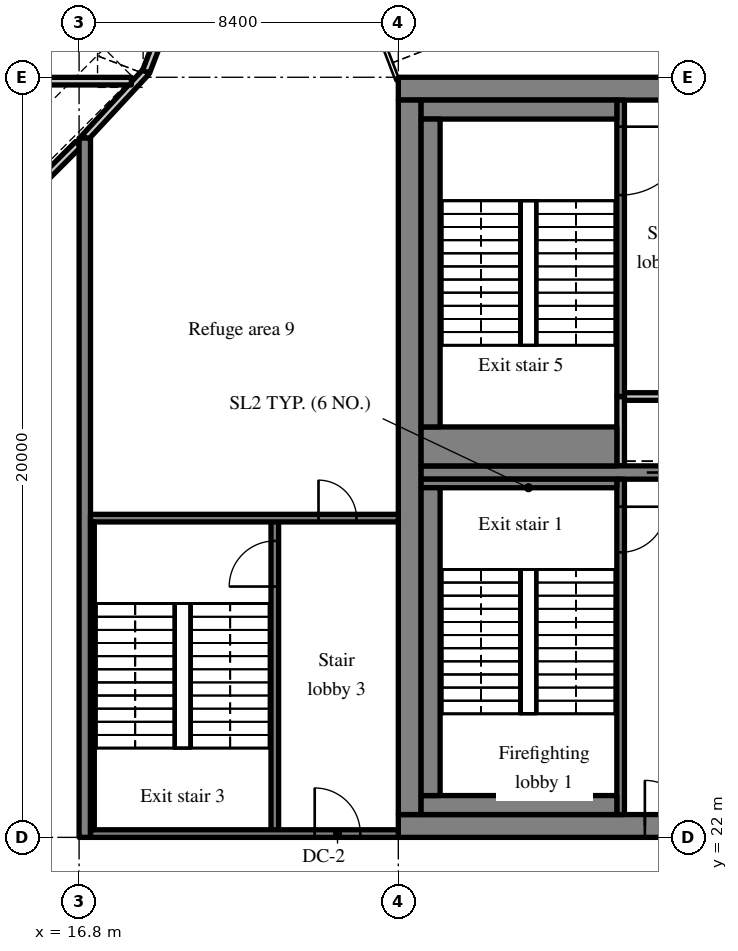
"""IFC4 building model, lengths in metres.
Left out: names, types, materials, properties, quantities, classifications, styles, units other than length and angle.
Written with IfcOpenShell. Run it as: python <this file> out.ifc"""

import sys

from ifc_helpers import new_model, si_unit, direction, frame, frame_2d, origin, place, context, subcontext, project, spatial, rectangle, extrude, source, transform, mapped, element, fill, save


model = new_model("IFC4")
c1 = context("Model", 3, precision=1e-05, world=origin(), true_north=direction((0.0, 1.0)))
c2 = subcontext(c1, "Body", "Model", "MODEL_VIEW")
j1 = project(units=[si_unit("LENGTHUNIT", "METRE"), si_unit("PLANEANGLEUNIT", "RADIAN")], contexts=[c1])
p1 = place(None, origin())
s1 = spatial("IfcSite", under=j1, at=p1, CompositionType="ELEMENT")
p2 = place(p1, origin())
s2 = spatial("IfcBuilding", under=s1, at=p2, CompositionType="ELEMENT")
p3 = place(p2, frame((0.0, 0.0, 206.4)))
s3 = spatial("IfcBuildingStorey", under=s2, at=p3, CompositionType="ELEMENT", Elevation=206.4)
m1 = source(origin(), c2, "Body", "SweptSolid", [
    extrude(rectangle(XDim=50.4, YDim=0.6, at=frame_2d((25.2, 0.0))), origin(), (0.0, 0.0, 1.0), 7.32),
])
p4 = place(p3, frame((25.2, 22.3, 0.0), z_axis=(0.0, 0.0, 1.0), x_axis=(1.0, 0.0, 0.0)))
e1 = element("IfcWall", 1, at=p4, inside=s3, PredefinedType="SHEAR", context=c2, shape_type="MappedRepresentation", body=[
    mapped(m1, transform((0.0, 0.0, 0.0), scale=1.0)),
])
m2 = source(origin(), c2, "Body", "SweptSolid", [
    extrude(rectangle(XDim=1.2, YDim=2.1, at=frame_2d((0.6, 1.05))), frame((0.0, 0.31, 0.0), z_axis=(0.0, -1.0, 0.0), x_axis=(1.0, 0.0, 0.0)), (0.0, 0.0, 1.0), 0.62),
])
p5 = place(p4, frame((22.262, 0.0, 0.0)))
e2 = element("IfcOpeningElement", 2, at=p5, cuts=e1, PredefinedType="OPENING", context=c2, shape_type="MappedRepresentation", body=[
    mapped(m2, transform((0.0, 0.0, 0.0), scale=1.0)),
])
m3 = source(origin(), c2, "Body", "SweptSolid", [
    extrude(rectangle(XDim=0.9, YDim=2.1, at=frame_2d((0.45, 1.05))), frame((0.0, 0.31, 0.0), z_axis=(0.0, -1.0, 0.0), x_axis=(1.0, 0.0, 0.0)), (0.0, 0.0, 1.0), 0.62),
])
p6 = place(p4, frame((17.25, 0.0, 0.0)))
e3 = element("IfcOpeningElement", 3, at=p6, cuts=e1, PredefinedType="OPENING", context=c2, shape_type="MappedRepresentation", body=[
    mapped(m3, transform((0.0, 0.0, 0.0), scale=1.0)),
])
p7 = place(p4, frame((9.656, 0.0, 0.0)))
e4 = element("IfcOpeningElement", 4, at=p7, cuts=e1, PredefinedType="OPENING", context=c2, shape_type="MappedRepresentation", body=[
    mapped(m3, transform((0.0, 0.0, 0.0), scale=1.0)),
])
p8 = place(p4, frame((12.719, 0.0, 0.0)))
e5 = element("IfcOpeningElement", 5, at=p8, cuts=e1, PredefinedType="OPENING", context=c2, shape_type="MappedRepresentation", body=[
    mapped(m3, transform((0.0, 0.0, 0.0), scale=1.0)),
])
m4 = source(origin(), c2, "Body", "SweptSolid", [
    extrude(rectangle(XDim=1.8, YDim=2.1, at=frame_2d((0.9, 1.05))), frame((0.0, 0.31, 0.0), z_axis=(0.0, -1.0, 0.0), x_axis=(1.0, 0.0, 0.0)), (0.0, 0.0, 1.0), 0.62),
])
p9 = place(p4, frame((32.7, 0.0, 0.0)))
e6 = element("IfcOpeningElement", 6, at=p9, cuts=e1, PredefinedType="OPENING", context=c2, shape_type="MappedRepresentation", body=[
    mapped(m4, transform((0.0, 0.0, 0.0), scale=1.0)),
])
p10 = place(p4, frame((6.488, 0.0, 0.0)))
e7 = element("IfcOpeningElement", 7, at=p10, cuts=e1, PredefinedType="OPENING", context=c2, shape_type="MappedRepresentation", body=[
    mapped(m2, transform((0.0, 0.0, 0.0), scale=1.0)),
])
p11 = place(p4, frame((47.925, 0.0, 0.0)))
e8 = element("IfcOpeningElement", 8, at=p11, cuts=e1, PredefinedType="OPENING", context=c2, shape_type="MappedRepresentation", body=[
    mapped(m2, transform((0.0, 0.0, 0.0), scale=1.0)),
])
p12 = place(p3, frame((25.2, 41.7, 0.0), z_axis=(0.0, 0.0, 1.0), x_axis=(1.0, 0.0, 0.0)))
e9 = element("IfcWall", 9, at=p12, inside=s3, PredefinedType="SHEAR", context=c2, shape_type="MappedRepresentation", body=[
    mapped(m1, transform((0.0, 0.0, 0.0), scale=1.0)),
])
m5 = source(origin(), c2, "Body", "SweptSolid", [
    extrude(rectangle(XDim=18.8, YDim=0.6, at=frame_2d((9.4, 0.0))), origin(), (0.0, 0.0, 1.0), 7.32),
])
p13 = place(p3, frame((25.5, 22.6, 0.0), z_axis=(0.0, 0.0, 1.0), x_axis=(0.0, 1.0, 0.0)))
e10 = element("IfcWall", 10, at=p13, inside=s3, PredefinedType="SHEAR", context=c2, shape_type="MappedRepresentation", body=[
    mapped(m5, transform((0.0, 0.0, 0.0), scale=1.0)),
])
m6 = source(origin(), c2, "Body", "SweptSolid", [
    extrude(rectangle(XDim=7.625, YDim=0.35, at=frame_2d((3.812, 0.0))), origin(), (0.0, 0.0, 1.0), 7.32),
])
p14 = place(p3, frame((25.8, 31.6, 0.0), z_axis=(0.0, 0.0, 1.0), x_axis=(1.0, 0.0, 0.0)))
e11 = element("IfcWall", 11, at=p14, inside=s3, PredefinedType="SHEAR", context=c2, shape_type="MappedRepresentation", body=[
    mapped(m6, transform((0.0, 0.0, 0.0), scale=1.0)),
])
m7 = source(origin(), c2, "Body", "SweptSolid", [
    extrude(rectangle(XDim=1.1, YDim=2.1, at=frame_2d((0.55, 1.05))), frame((0.0, 0.185, 0.0), z_axis=(0.0, -1.0, 0.0), x_axis=(1.0, 0.0, 0.0)), (0.0, 0.0, 1.0), 0.37),
])
p15 = place(p14, frame((5.938, 0.0, 0.0)))
e12 = element("IfcOpeningElement", 12, at=p15, cuts=e11, PredefinedType="OPENING", context=c2, shape_type="MappedRepresentation", body=[
    mapped(m7, transform((0.0, 0.0, 0.0), scale=1.0)),
])
m8 = source(origin(), c2, "Body", "SweptSolid", [
    extrude(rectangle(XDim=18.4, YDim=0.3, at=frame_2d((9.2, 0.0))), origin(), (0.0, 0.0, 1.0), 7.32),
])
p16 = place(p3, frame((16.95, 22.0, 0.0), z_axis=(0.0, 0.0, 1.0), x_axis=(0.0, 1.0, 0.0)))
e13 = element("IfcWall", 13, at=p16, inside=s3, PredefinedType="SHEAR", context=c2, shape_type="MappedRepresentation", body=[
    mapped(m8, transform((0.0, 0.0, 0.0), scale=1.0)),
])
m9 = source(origin(), c2, "Body", "SweptSolid", [
    extrude(rectangle(XDim=2.324, YDim=0.2, at=frame_2d((1.162, 0.0))), origin(), (0.0, 0.0, 1.0), 1.1),
])
p17 = place(p3, frame((15.136, 38.595, 0.0), z_axis=(0.0, 0.0, 1.0), x_axis=(0.707106781187, 0.707106781187, 0.0)))
e14 = element("IfcWall", 14, at=p17, inside=s3, PredefinedType="PARAPET", context=c2, shape_type="MappedRepresentation", body=[
    mapped(m9, transform((0.0, 0.0, 0.0), scale=1.0)),
])
m10 = source(origin(), c2, "Body", "SweptSolid", [
    extrude(rectangle(XDim=2.355, YDim=0.2, at=frame_2d((1.178, 0.0))), origin(), (0.0, 0.0, 1.0), 1.1),
])
p18 = place(p3, frame((16.961, 40.42, 0.0), z_axis=(0.0, 0.0, 1.0), x_axis=(0.68007331117, 0.733144113687, 0.0)))
e15 = element("IfcWall", 15, at=p18, inside=s3, PredefinedType="PARAPET", context=c2, shape_type="MappedRepresentation", body=[
    mapped(m10, transform((0.0, 0.0, 0.0), scale=1.0)),
])
m11 = source(origin(), c2, "Body", "SweptSolid", [
    extrude(rectangle(XDim=1.391, YDim=0.2, at=frame_2d((0.695, 0.0))), origin(), (0.0, 0.0, 1.0), 1.1),
])
p19 = place(p3, frame((18.563, 42.147, 0.0), z_axis=(0.0, 0.0, 1.0), x_axis=(0.357790593379, 0.933801847979, 0.0)))
e16 = element("IfcWall", 16, at=p19, inside=s3, PredefinedType="PARAPET", context=c2, shape_type="MappedRepresentation", body=[
    mapped(m11, transform((0.0, 0.0, 0.0), scale=1.0)),
])
m12 = source(origin(), c2, "Body", "SweptSolid", [
    extrude(rectangle(XDim=5.734, YDim=0.2, at=frame_2d((2.867, 0.0))), origin(), (0.0, 0.0, 1.0), 1.1),
])
p20 = place(p3, frame((12.442, 41.898, -0.05), z_axis=(0.0, 0.0, 1.0), x_axis=(1.0, 0.0, 0.0)))
e17 = element("IfcWall", 17, at=p20, inside=s3, PredefinedType="PARAPET", context=c2, shape_type="MappedRepresentation", body=[
    mapped(m12, transform((0.0, 0.0, 0.0), scale=1.0)),
])
m13 = source(origin(), c2, "Body", "SweptSolid", [
    extrude(rectangle(XDim=8.825, YDim=0.2, at=frame_2d((4.413, 0.0))), origin(), (0.0, 0.0, 1.0), 7.32),
])
p21 = place(p3, frame((31.05, 22.6, 0.0), z_axis=(0.0, 0.0, 1.0), x_axis=(0.0, 1.0, 0.0)))
e18 = element("IfcWall", 18, at=p21, inside=s3, PredefinedType="SOLIDWALL", context=c2, shape_type="MappedRepresentation", body=[
    mapped(m13, transform((0.0, 0.0, 0.0), scale=1.0)),
])
m14 = source(origin(), c2, "Body", "SweptSolid", [
    extrude(rectangle(XDim=1.2, YDim=2.1, at=frame_2d((0.6, 1.05))), frame((0.0, 0.11, 0.0), z_axis=(0.0, -1.0, 0.0), x_axis=(1.0, 0.0, 0.0)), (0.0, 0.0, 1.0), 0.22),
])
p22 = place(p21, frame((6.9, 0.0, 0.0)))
e19 = element("IfcOpeningElement", 19, at=p22, cuts=e18, PredefinedType="OPENING", context=c2, shape_type="MappedRepresentation", body=[
    mapped(m14, transform((0.0, 0.0, 0.0), scale=1.0)),
])
m15 = source(origin(), c2, "Body", "SweptSolid", [
    extrude(rectangle(XDim=1.825, YDim=0.2, at=frame_2d((0.913, 0.0))), origin(), (0.0, 0.0, 1.0), 7.32),
])
p23 = place(p3, frame((31.05, 31.775, 0.0), z_axis=(0.0, 0.0, 1.0), x_axis=(0.0, 1.0, 0.0)))
e20 = element("IfcWall", 20, at=p23, inside=s3, PredefinedType="SOLIDWALL", context=c2, shape_type="MappedRepresentation", body=[
    mapped(m15, transform((0.0, 0.0, 0.0), scale=1.0)),
])
m16 = source(origin(), c2, "Body", "SweptSolid", [
    extrude(rectangle(XDim=2.275, YDim=0.2, at=frame_2d((1.138, 0.0))), origin(), (0.0, 0.0, 1.0), 7.32),
])
p24 = place(p3, frame((31.15, 33.6, 0.0), z_axis=(0.0, 0.0, 1.0), x_axis=(1.0, 0.0, 0.0)))
e21 = element("IfcWall", 21, at=p24, inside=s3, PredefinedType="SOLIDWALL", context=c2, shape_type="MappedRepresentation", body=[
    mapped(m16, transform((0.0, 0.0, 0.0), scale=1.0)),
])
m17 = source(origin(), c2, "Body", "SweptSolid", [
    extrude(rectangle(XDim=7.8, YDim=0.2, at=frame_2d((3.9, 0.0))), origin(), (0.0, 0.0, 1.0), 7.32),
])
p25 = place(p3, frame((31.05, 33.6, 0.0), z_axis=(0.0, 0.0, 1.0), x_axis=(0.0, 1.0, 0.0)))
e22 = element("IfcWall", 22, at=p25, inside=s3, PredefinedType="SOLIDWALL", context=c2, shape_type="MappedRepresentation", body=[
    mapped(m17, transform((0.0, 0.0, 0.0), scale=1.0)),
])
m18 = source(origin(), c2, "Body", "SweptSolid", [
    extrude(rectangle(XDim=1.8, YDim=2.1, at=frame_2d((0.9, 1.05))), frame((0.0, 0.11, 0.0), z_axis=(0.0, -1.0, 0.0), x_axis=(1.0, 0.0, 0.0)), (0.0, 0.0, 1.0), 0.22),
])
p26 = place(p25, frame((5.3, 0.0, 0.0)))
e23 = element("IfcOpeningElement", 23, at=p26, cuts=e22, PredefinedType="OPENING", context=c2, shape_type="MappedRepresentation", body=[
    mapped(m18, transform((0.0, 0.0, 0.0), scale=1.0)),
])
m19 = source(origin(), c2, "Body", "SweptSolid", [
    extrude(rectangle(XDim=8.3, YDim=0.2, at=frame_2d((4.15, 0.0))), origin(), (0.0, 0.0, 1.0), 7.32),
])
p27 = place(p3, frame((21.95, 22.1, 0.0), z_axis=(0.0, 0.0, 1.0), x_axis=(0.0, 1.0, 0.0)))
e24 = element("IfcWall", 24, at=p27, inside=s3, PredefinedType="SOLIDWALL", context=c2, shape_type="MappedRepresentation", body=[
    mapped(m19, transform((0.0, 0.0, 0.0), scale=1.0)),
])
p28 = place(p27, frame((6.5, 0.0, 0.0)))
e25 = element("IfcOpeningElement", 25, at=p28, cuts=e24, PredefinedType="OPENING", context=c2, shape_type="MappedRepresentation", body=[
    mapped(m14, transform((0.0, 0.0, 0.0), scale=1.0)),
])
m20 = source(origin(), c2, "Body", "SweptSolid", [
    extrude(rectangle(XDim=8.1, YDim=0.2, at=frame_2d((4.05, 0.0))), origin(), (0.0, 0.0, 1.0), 7.32),
])
p29 = place(p3, frame((17.1, 22.1, 0.0), z_axis=(0.0, 0.0, 1.0), x_axis=(1.0, 0.0, 0.0)))
e26 = element("IfcWall", 26, at=p29, inside=s3, PredefinedType="SOLIDWALL", context=c2, shape_type="MappedRepresentation", body=[
    mapped(m20, transform((0.0, 0.0, 0.0), scale=1.0)),
])
p30 = place(p29, frame((5.9, 0.0, 0.0)))
e27 = element("IfcOpeningElement", 27, at=p30, cuts=e26, PredefinedType="OPENING", context=c2, shape_type="MappedRepresentation", body=[
    mapped(m14, transform((0.0, 0.0, 0.0), scale=1.0)),
])
p31 = place(p3, frame((17.1, 30.4, 0.0), z_axis=(0.0, 0.0, 1.0), x_axis=(1.0, 0.0, 0.0)))
e28 = element("IfcWall", 28, at=p31, inside=s3, PredefinedType="SOLIDWALL", context=c2, shape_type="MappedRepresentation", body=[
    mapped(m20, transform((0.0, 0.0, 0.0), scale=1.0)),
])
m21 = source(origin(), c2, "Body", "SweptSolid", [
    extrude(rectangle(XDim=1.0, YDim=2.1, at=frame_2d((0.5, 1.05))), frame((0.0, 0.11, 0.0), z_axis=(0.0, -1.0, 0.0), x_axis=(1.0, 0.0, 0.0)), (0.0, 0.0, 1.0), 0.22),
])
p32 = place(p31, frame((6.0, 0.0, 0.0)))
e29 = element("IfcOpeningElement", 29, at=p32, cuts=e28, PredefinedType="OPENING", context=c2, shape_type="MappedRepresentation", body=[
    mapped(m21, transform((0.0, 0.0, 0.0), scale=1.0)),
])
m22 = source(origin(), c2, "Body", "SweptSolid", [
    extrude(rectangle(XDim=5.15, YDim=0.5, at=frame_2d((2.575, 0.0))), origin(), (0.0, 0.0, 1.0), 7.32),
])
p33 = place(p3, frame((25.8, 22.85, 0.0), z_axis=(0.0, 0.0, 1.0), x_axis=(1.0, 0.0, 0.0)))
e30 = element("IfcWall", 30, at=p33, inside=s3, PredefinedType="SOLIDWALL", context=c2, shape_type="MappedRepresentation", body=[
    mapped(m22, transform((0.0, 0.0, 0.0), scale=1.0)),
])
m23 = source(origin(), c2, "Body", "SweptSolid", [
    extrude(rectangle(XDim=5.15, YDim=0.225, at=frame_2d((2.575, 0.0))), origin(), (0.0, 0.0, 1.0), 7.32),
])
p34 = place(p3, frame((25.8, 31.312, 0.0), z_axis=(0.0, 0.0, 1.0), x_axis=(1.0, 0.0, 0.0)))
e31 = element("IfcWall", 31, at=p34, inside=s3, PredefinedType="SOLIDWALL", context=c2, shape_type="MappedRepresentation", body=[
    mapped(m23, transform((0.0, 0.0, 0.0), scale=1.0)),
])
m24 = source(origin(), c2, "Body", "SweptSolid", [
    extrude(rectangle(XDim=8.1, YDim=0.5, at=frame_2d((4.05, 0.0))), origin(), (0.0, 0.0, 1.0), 7.32),
])
p35 = place(p3, frame((26.05, 23.1, 0.0), z_axis=(0.0, 0.0, 1.0), x_axis=(0.0, 1.0, 0.0)))
e32 = element("IfcWall", 32, at=p35, inside=s3, PredefinedType="SOLIDWALL", context=c2, shape_type="MappedRepresentation", body=[
    mapped(m24, transform((0.0, 0.0, 0.0), scale=1.0)),
])
m25 = source(origin(), c2, "Body", "SweptSolid", [
    extrude(rectangle(XDim=8.1, YDim=0.1, at=frame_2d((4.05, 0.0))), origin(), (0.0, 0.0, 1.0), 7.32),
])
p36 = place(p3, frame((17.15, 22.2, 0.0), z_axis=(0.0, 0.0, 1.0), x_axis=(0.0, 1.0, 0.0)))
e33 = element("IfcWall", 33, at=p36, inside=s3, PredefinedType="SOLIDWALL", context=c2, shape_type="MappedRepresentation", body=[
    mapped(m25, transform((0.0, 0.0, 0.0), scale=1.0)),
])
p37 = place(p3, frame((25.8, 41.15, 0.0), z_axis=(0.0, 0.0, 1.0), x_axis=(1.0, 0.0, 0.0)))
e34 = element("IfcWall", 34, at=p37, inside=s3, PredefinedType="SOLIDWALL", context=c2, shape_type="MappedRepresentation", body=[
    mapped(m22, transform((0.0, 0.0, 0.0), scale=1.0)),
])
m26 = source(origin(), c2, "Body", "SweptSolid", [
    extrude(rectangle(XDim=5.15, YDim=1.025, at=frame_2d((2.575, 0.0))), origin(), (0.0, 0.0, 1.0), 7.32),
])
p38 = place(p3, frame((25.8, 32.287, 0.0), z_axis=(0.0, 0.0, 1.0), x_axis=(1.0, 0.0, 0.0)))
e35 = element("IfcWall", 35, at=p38, inside=s3, PredefinedType="SOLIDWALL", context=c2, shape_type="MappedRepresentation", body=[
    mapped(m26, transform((0.0, 0.0, 0.0), scale=1.0)),
])
p39 = place(p3, frame((26.05, 32.8, 0.0), z_axis=(0.0, 0.0, 1.0), x_axis=(0.0, 1.0, 0.0)))
e36 = element("IfcWall", 36, at=p39, inside=s3, PredefinedType="SOLIDWALL", context=c2, shape_type="MappedRepresentation", body=[
    mapped(m24, transform((0.0, 0.0, 0.0), scale=1.0)),
])
m27 = source(origin(), c2, "Body", "SweptSolid", [
    extrude(rectangle(XDim=1.2, YDim=2.1, at=frame_2d((0.6, 1.05))), frame((0.0, 0.025, 0.0), z_axis=(0.0, -1.0, 0.0), x_axis=(1.0, 0.0, 0.0)), (0.0, 0.0, 1.0), 0.05),
])
p40 = place(p22, origin())
e37 = element("IfcDoor", 37, at=p40, inside=s3, OperationType="SINGLE_SWING_RIGHT", PredefinedType="DOOR", context=c2, shape_type="MappedRepresentation", body=[
    mapped(m27, transform((0.0, 0.0, 0.0), scale=1.0)),
])
fill(e19, e37)
m28 = source(origin(), c2, "Body", "SweptSolid", [
    extrude(rectangle(XDim=1.2, YDim=2.1, at=frame_2d((0.6, 1.05))), frame((0.0, 0.225, 0.0), z_axis=(0.0, -1.0, 0.0), x_axis=(1.0, 0.0, 0.0)), (0.0, 0.0, 1.0), 0.05),
])
p41 = place(p10, origin())
e38 = element("IfcDoor", 38, at=p41, inside=s3, OperationType="SINGLE_SWING_LEFT", PredefinedType="DOOR", context=c2, shape_type="MappedRepresentation", body=[
    mapped(m28, transform((0.0, 0.0, 0.0), scale=1.0)),
])
fill(e7, e38)
m29 = source(origin(), c2, "Body", "SweptSolid", [
    extrude(rectangle(XDim=1.1, YDim=2.1, at=frame_2d((0.55, 1.05))), frame((0.0, 0.025, 0.0), z_axis=(0.0, -1.0, 0.0), x_axis=(1.0, 0.0, 0.0)), (0.0, 0.0, 1.0), 0.05),
])
p42 = place(p15, origin())
e39 = element("IfcDoor", 39, at=p42, inside=s3, OperationType="SLIDING_TO_LEFT", PredefinedType="DOOR", context=c2, shape_type="MappedRepresentation", body=[
    mapped(m29, transform((0.0, 0.0, 0.0), scale=1.0)),
])
fill(e12, e39)
m30 = source(origin(), c2, "Body", "SweptSolid", [
    extrude(rectangle(XDim=1.8, YDim=2.1, at=frame_2d((0.9, 1.05))), frame((0.0, 0.025, 0.0), z_axis=(0.0, -1.0, 0.0), x_axis=(1.0, 0.0, 0.0)), (0.0, 0.0, 1.0), 0.05),
])
p43 = place(p26, origin())
e40 = element("IfcDoor", 40, at=p43, inside=s3, OperationType="SINGLE_SWING_RIGHT", PredefinedType="DOOR", context=c2, shape_type="MappedRepresentation", body=[
    mapped(m30, transform((0.0, 0.0, 0.0), scale=1.0)),
])
fill(e23, e40)
p44 = place(p28, origin())
e41 = element("IfcDoor", 41, at=p44, inside=s3, OperationType="SINGLE_SWING_LEFT", PredefinedType="DOOR", context=c2, shape_type="MappedRepresentation", body=[
    mapped(m27, transform((0.0, 0.0, 0.0), scale=1.0)),
])
fill(e25, e41)
p45 = place(p30, origin())
e42 = element("IfcDoor", 42, at=p45, inside=s3, OperationType="SINGLE_SWING_LEFT", PredefinedType="DOOR", context=c2, shape_type="MappedRepresentation", body=[
    mapped(m27, transform((0.0, 0.0, 0.0), scale=1.0)),
])
fill(e27, e42)
m31 = source(origin(), c2, "Body", "SweptSolid", [
    extrude(rectangle(XDim=1.0, YDim=2.1, at=frame_2d((0.5, 1.05))), frame((0.0, 0.025, 0.0), z_axis=(0.0, -1.0, 0.0), x_axis=(1.0, 0.0, 0.0)), (0.0, 0.0, 1.0), 0.05),
])
p46 = place(p32, origin())
e43 = element("IfcDoor", 43, at=p46, inside=s3, OperationType="SINGLE_SWING_LEFT", PredefinedType="DOOR", context=c2, shape_type="MappedRepresentation", body=[
    mapped(m31, transform((0.0, 0.0, 0.0), scale=1.0)),
])
fill(e29, e43)
save(model, sys.argv[1])
